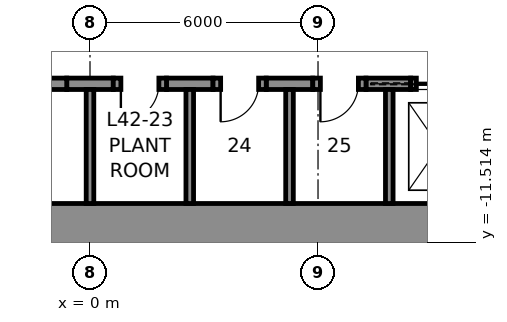
"""IFC4 building model, lengths in metres.
Left out: names, types, materials, properties, quantities, classifications, styles, units other than length and angle.
Written with IfcOpenShell. Run it as: python <this file> out.ifc"""

import sys

from ifc_helpers import new_model, si_unit, direction, frame, frame_2d, origin, place, context, subcontext, project, spatial, rectangle, extrude, element, fill, save


model = new_model("IFC4")
c1 = context("Model", 3, precision=1e-05, world=origin(), true_north=direction((0.0, 1.0)))
c2 = subcontext(c1, "Body", "Model", "MODEL_VIEW")
j1 = project(units=[si_unit("LENGTHUNIT", "METRE"), si_unit("PLANEANGLEUNIT", "RADIAN")], contexts=[c1])
p1 = place(None, origin())
s1 = spatial("IfcSite", under=j1, at=p1, CompositionType="ELEMENT")
p2 = place(p1, origin())
s2 = spatial("IfcBuilding", under=s1, at=p2, CompositionType="ELEMENT")
p3 = place(p2, frame((0.0, 0.0, 196.8)))
s3 = spatial("IfcBuildingStorey", under=s2, at=p3, CompositionType="ELEMENT", Elevation=196.8)
p4 = place(p3, frame((12.0, -11.25, 0.0), z_axis=(0.0, 0.0, 1.0), x_axis=(-1.0, 0.0, 0.0)))
e1 = element("IfcWall", 1, at=p4, inside=s3, PredefinedType="SHEAR", context=c2, shape_type="SweptSolid", body=[
    extrude(rectangle(XDim=24.0, YDim=1.5, at=frame_2d((12.0, 0.0))), origin(), (0.0, 0.0, 1.0), 5.0),
])
for number, where, z_axis, x_axis in (
    (2, (-0.613, -7.35, 0.0), (0.0, 0.0, 1.0), (1.0, 0.0, 0.0)),
    (3, (2.012, -7.35, 0.0), (0.0, 0.0, 1.0), (1.0, 0.0, 0.0)),
    (4, (4.637, -7.35, 0.0), (0.0, 0.0, 1.0), (1.0, 0.0, 0.0)),
):
    element("IfcWall", number, at=place(p3, frame(where, z_axis=z_axis, x_axis=x_axis)), inside=s3, PredefinedType="SHEAR", context=c2, shape_type="SweptSolid", body=[
        extrude(rectangle(XDim=1.225, YDim=0.3, at=frame_2d((0.613, 0.0))), origin(), (0.0, 0.0, 1.0), 5.0),
    ])
p5 = place(p3, frame((7.262, -7.35, 0.0), z_axis=(0.0, 0.0, 1.0), x_axis=(1.0, 0.0, 0.0)))
e5 = element("IfcWall", 5, at=p5, inside=s3, PredefinedType="SHEAR", context=c2, shape_type="SweptSolid", body=[
    extrude(rectangle(XDim=1.175, YDim=0.3, at=frame_2d((0.587, 0.0))), origin(), (0.0, 0.0, 1.0), 5.0),
])
p6 = place(p3, frame((-2.012, -7.35, 0.0), z_axis=(0.0, 0.0, 1.0), x_axis=(1.0, 0.0, 0.0)))
e6 = element("IfcWall", 6, at=p6, inside=s3, PredefinedType="PARTITIONING", context=c2, shape_type="SweptSolid", body=[
    extrude(rectangle(XDim=1.4, YDim=0.3, at=frame_2d((0.7, 0.0))), origin(), (0.0, 0.0, 1.0), 5.0),
])
p7 = place(p3, frame((0.613, -7.35, 0.0), z_axis=(0.0, 0.0, 1.0), x_axis=(1.0, 0.0, 0.0)))
e7 = element("IfcWall", 7, at=p7, inside=s3, PredefinedType="PARTITIONING", context=c2, shape_type="SweptSolid", body=[
    extrude(rectangle(XDim=1.4, YDim=0.3, at=frame_2d((0.7, 0.0))), origin(), (0.0, 0.0, 1.0), 5.0),
])
p8 = place(p7, frame((0.2, 0.0, 0.0)))
e8 = element("IfcOpeningElement", 8, at=p8, cuts=e7, PredefinedType="OPENING", context=c2, shape_type="SweptSolid", body=[
    extrude(rectangle(XDim=1.0, YDim=2.3, at=frame_2d((0.5, 1.15))), frame((0.0, 0.16, 0.0), z_axis=(0.0, -1.0, 0.0), x_axis=(1.0, 0.0, 0.0)), (0.0, 0.0, 1.0), 0.32),
])
p9 = place(p3, frame((3.238, -7.35, 0.0), z_axis=(0.0, 0.0, 1.0), x_axis=(1.0, 0.0, 0.0)))
e9 = element("IfcWall", 9, at=p9, inside=s3, PredefinedType="PARTITIONING", context=c2, shape_type="SweptSolid", body=[
    extrude(rectangle(XDim=1.4, YDim=0.3, at=frame_2d((0.7, 0.0))), origin(), (0.0, 0.0, 1.0), 5.0),
])
p10 = place(p9, frame((0.2, 0.0, 0.0)))
e10 = element("IfcOpeningElement", 10, at=p10, cuts=e9, PredefinedType="OPENING", context=c2, shape_type="SweptSolid", body=[
    extrude(rectangle(XDim=1.0, YDim=2.3, at=frame_2d((0.5, 1.15))), frame((0.0, 0.16, 0.0), z_axis=(0.0, -1.0, 0.0), x_axis=(1.0, 0.0, 0.0)), (0.0, 0.0, 1.0), 0.32),
])
p11 = place(p3, frame((5.863, -7.35, 0.0), z_axis=(0.0, 0.0, 1.0), x_axis=(1.0, 0.0, 0.0)))
e11 = element("IfcWall", 11, at=p11, inside=s3, PredefinedType="PARTITIONING", context=c2, shape_type="SweptSolid", body=[
    extrude(rectangle(XDim=1.4, YDim=0.3, at=frame_2d((0.7, 0.0))), origin(), (0.0, 0.0, 1.0), 5.0),
])
p12 = place(p11, frame((0.2, 0.0, 0.0)))
e12 = element("IfcOpeningElement", 12, at=p12, cuts=e11, PredefinedType="OPENING", context=c2, shape_type="SweptSolid", body=[
    extrude(rectangle(XDim=1.0, YDim=2.3, at=frame_2d((0.5, 1.15))), frame((0.0, 0.16, 0.0), z_axis=(0.0, -1.0, 0.0), x_axis=(1.0, 0.0, 0.0)), (0.0, 0.0, 1.0), 0.32),
])
p13 = place(p3, frame((8.438, -7.35, 0.0), z_axis=(0.0, 0.0, 1.0), x_axis=(1.0, 0.0, 0.0)))
e13 = element("IfcWall", 13, at=p13, inside=s3, PredefinedType="PARTITIONING", context=c2, shape_type="SweptSolid", body=[
    extrude(rectangle(XDim=1.5, YDim=0.3, at=frame_2d((0.75, 0.0))), origin(), (0.0, 0.0, 1.0), 5.0),
])
p14 = place(p13, frame((0.15, 0.0, 0.0)))
e14 = element("IfcOpeningElement", 14, at=p14, cuts=e13, PredefinedType="OPENING", context=c2, shape_type="SweptSolid", body=[
    extrude(rectangle(XDim=1.2, YDim=2.3, at=frame_2d((0.6, 1.15))), frame((0.0, 0.16, 0.0), z_axis=(0.0, -1.0, 0.0), x_axis=(1.0, 0.0, 0.0)), (0.0, 0.0, 1.0), 0.32),
])
for number, where, z_axis, x_axis in (
    (15, (0.0, -10.5, 0.0), (0.0, 0.0, 1.0), (0.0, 1.0, 0.0)),
    (16, (2.625, -10.5, 0.0), (0.0, 0.0, 1.0), (0.0, 1.0, 0.0)),
    (17, (5.25, -10.5, 0.0), (0.0, 0.0, 1.0), (0.0, 1.0, 0.0)),
    (18, (7.875, -10.5, 0.0), (0.0, 0.0, 1.0), (0.0, 1.0, 0.0)),
):
    element("IfcWall", number, at=place(p3, frame(where, z_axis=z_axis, x_axis=x_axis)), inside=s3, PredefinedType="PARTITIONING", context=c2, shape_type="SweptSolid", body=[
        extrude(rectangle(XDim=3.0, YDim=0.2, at=frame_2d((1.5, 0.0))), origin(), (0.0, 0.0, 1.0), 5.0),
    ])
p15 = place(p8, frame((1.0, 0.0, 0.0), z_axis=(0.0, 0.0, 1.0), x_axis=(-1.0, 0.0, 0.0)))
e19 = element("IfcDoor", 19, at=p15, inside=s3, OperationType="SINGLE_SWING_RIGHT", PredefinedType="DOOR", context=c2, shape_type="SweptSolid", body=[
    extrude(rectangle(XDim=1.0, YDim=2.3, at=frame_2d((0.5, 1.15))), frame((0.0, 0.025, 0.0), z_axis=(0.0, -1.0, 0.0), x_axis=(1.0, 0.0, 0.0)), (0.0, 0.0, 1.0), 0.05),
])
fill(e8, e19)
p16 = place(p10, frame((1.0, 0.0, 0.0), z_axis=(0.0, 0.0, 1.0), x_axis=(-1.0, 0.0, 0.0)))
e20 = element("IfcDoor", 20, at=p16, inside=s3, OperationType="SINGLE_SWING_RIGHT", PredefinedType="DOOR", context=c2, shape_type="SweptSolid", body=[
    extrude(rectangle(XDim=1.0, YDim=2.3, at=frame_2d((0.5, 1.15))), frame((0.0, 0.025, 0.0), z_axis=(0.0, -1.0, 0.0), x_axis=(1.0, 0.0, 0.0)), (0.0, 0.0, 1.0), 0.05),
])
fill(e10, e20)
p17 = place(p12, frame((1.0, 0.0, 0.0), z_axis=(0.0, 0.0, 1.0), x_axis=(-1.0, 0.0, 0.0)))
e21 = element("IfcDoor", 21, at=p17, inside=s3, OperationType="SINGLE_SWING_RIGHT", PredefinedType="DOOR", context=c2, shape_type="SweptSolid", body=[
    extrude(rectangle(XDim=1.0, YDim=2.3, at=frame_2d((0.5, 1.15))), frame((0.0, 0.025, 0.0), z_axis=(0.0, -1.0, 0.0), x_axis=(1.0, 0.0, 0.0)), (0.0, 0.0, 1.0), 0.05),
])
fill(e12, e21)
p18 = place(p14, origin())
e22 = element("IfcDoor", 22, at=p18, inside=s3, OperationType="SLIDING_TO_LEFT", PredefinedType="DOOR", context=c2, shape_type="SweptSolid", body=[
    extrude(rectangle(XDim=1.2, YDim=2.3, at=frame_2d((0.6, 1.15))), frame((0.0, 0.025, 0.0), z_axis=(0.0, -1.0, 0.0), x_axis=(1.0, 0.0, 0.0)), (0.0, 0.0, 1.0), 0.05),
])
fill(e14, e22)
save(model, sys.argv[1])
